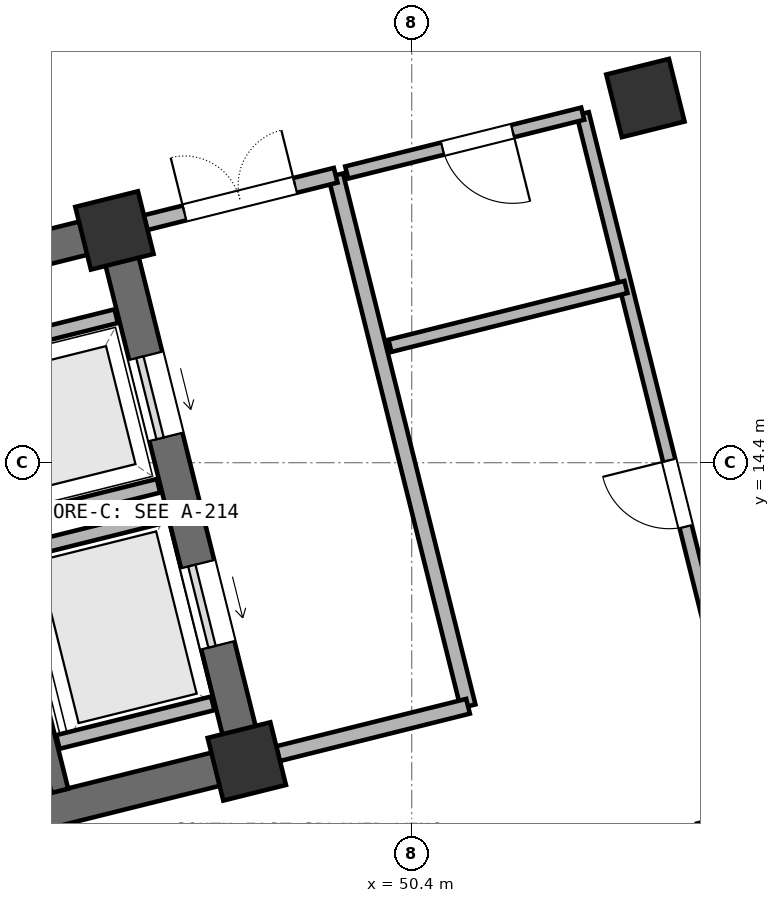
"""IFC4 building model, lengths in metres.
Left out: names, types, materials, properties, quantities, classifications, styles, units other than length and angle.
Written with IfcOpenShell. Run it as: python <this file> out.ifc"""

import sys

from ifc_helpers import new_model, si_unit, direction, frame, frame_2d, origin, origin_2d, place, context, subcontext, project, spatial, rectangle, extrude, element, fill, save


model = new_model("IFC4")
c1 = context("Model", 3, precision=1e-05, world=origin(), true_north=direction((0.0, 1.0)))
c2 = subcontext(c1, "Body", "Model", "MODEL_VIEW")
j1 = project(units=[si_unit("LENGTHUNIT", "METRE"), si_unit("PLANEANGLEUNIT", "RADIAN")], contexts=[c1])
p1 = place(None, origin())
s1 = spatial("IfcSite", under=j1, at=p1, CompositionType="ELEMENT")
p2 = place(p1, origin())
s2 = spatial("IfcBuilding", under=s1, at=p2, CompositionType="ELEMENT")
p3 = place(p2, origin())
s3 = spatial("IfcBuildingStorey", under=s2, at=p3, CompositionType="ELEMENT", Elevation=0.0)
for number, where, z_axis, x_axis in (
    (1, (48.23, 10.47, 0.0), (0.0, 0.0, 1.0), (0.97, 0.242, 0.0)),
    (2, (46.489, 17.456, 0.0), (0.0, 0.0, 1.0), (0.97, 0.242, 0.0)),
    (3, (53.475, 19.198, 0.0), (0.0, 0.0, 1.0), (0.97, 0.242, 0.0)),
):
    element("IfcColumn", number, at=place(p3, frame(where, z_axis=z_axis, x_axis=x_axis)), inside=s3, PredefinedType="COLUMN", context=c2, shape_type="SweptSolid", body=[
        extrude(rectangle(XDim=0.85, YDim=0.85, at=origin_2d()), origin(), (0.0, 0.0, 1.0), 5.4),
    ])
p4 = place(p3, frame((41.584, 8.813, 0.0), z_axis=(0.0, 0.0, 1.0), x_axis=(0.970294759049, 0.241925774902, 0.0)))
e4 = element("IfcWall", 4, at=p4, inside=s3, PredefinedType="SHEAR", context=c2, shape_type="SweptSolid", body=[
    extrude(rectangle(XDim=6.5, YDim=0.45, at=frame_2d((3.25, 0.0))), origin(), (0.0, 0.0, 1.0), 5.4),
])
p5 = place(p3, frame((48.146, 10.809, 0.0), z_axis=(0.0, 0.0, 1.0), x_axis=(-0.241925774902, 0.970294759049, 0.0)))
e5 = element("IfcWall", 5, at=p5, inside=s3, PredefinedType="SHEAR", context=c2, shape_type="SweptSolid", body=[
    extrude(rectangle(XDim=6.5, YDim=0.45, at=frame_2d((3.25, 0.0))), origin(), (0.0, 0.0, 1.0), 5.4),
])
p6 = place(p5, frame((1.225, 0.0, 0.0)))
e6 = element("IfcOpeningElement", 6, at=p6, cuts=e5, PredefinedType="OPENING", context=c2, shape_type="SweptSolid", body=[
    extrude(rectangle(XDim=1.1, YDim=2.2, at=frame_2d((0.55, 1.1))), frame((0.0, 0.235, 0.0), z_axis=(0.0, -1.0, 0.0), x_axis=(1.0, 0.0, 0.0)), (0.0, 0.0, 1.0), 0.47),
])
p7 = place(p5, frame((4.05, 0.0, 0.0)))
e7 = element("IfcOpeningElement", 7, at=p7, cuts=e5, PredefinedType="OPENING", context=c2, shape_type="SweptSolid", body=[
    extrude(rectangle(XDim=1.1, YDim=2.2, at=frame_2d((0.55, 1.1))), frame((0.0, 0.235, 0.0), z_axis=(0.0, -1.0, 0.0), x_axis=(1.0, 0.0, 0.0)), (0.0, 0.0, 1.0), 0.47),
])
p8 = place(p3, frame((46.149, 17.371, 0.0), z_axis=(0.0, 0.0, 1.0), x_axis=(-0.970294759049, -0.241925774902, 0.0)))
e8 = element("IfcWall", 8, at=p8, inside=s3, PredefinedType="SHEAR", context=c2, shape_type="SweptSolid", body=[
    extrude(rectangle(XDim=6.5, YDim=0.45, at=frame_2d((3.25, 0.0))), origin(), (0.0, 0.0, 1.0), 5.4),
])
p9 = place(p8, frame((3.6, 0.0, 0.0)))
e9 = element("IfcOpeningElement", 9, at=p9, cuts=e8, PredefinedType="OPENING", context=c2, shape_type="SweptSolid", body=[
    extrude(rectangle(XDim=1.2, YDim=2.2, at=frame_2d((0.6, 1.1))), frame((0.0, 0.235, 0.0), z_axis=(0.0, -1.0, 0.0), x_axis=(1.0, 0.0, 0.0)), (0.0, 0.0, 1.0), 0.47),
])
p10 = place(p3, frame((45.771, 10.083, 0.0), z_axis=(0.0, 0.0, 1.0), x_axis=(-0.241898249226, 0.970301621673, 0.0)))
e10 = element("IfcWall", 10, at=p10, inside=s3, PredefinedType="SHEAR", context=c2, shape_type="SweptSolid", body=[
    extrude(rectangle(XDim=6.76, YDim=0.225, at=frame_2d((3.38, 0.0))), origin(), (0.0, 0.0, 1.0), 5.4),
])
for number, where, z_axis, x_axis in (
    (11, (45.745, 10.726, 0.0), (0.0, 0.0, 1.0), (0.97, 0.242, 0.0)),
    (12, (45.128, 13.2, 0.0), (0.0, 0.0, 1.0), (0.97, 0.242, 0.0)),
    (13, (45.031, 13.588, 0.0), (0.0, 0.0, 1.0), (0.97, 0.242, 0.0)),
    (14, (44.475, 15.82, 0.0), (0.0, 0.0, 1.0), (0.97, 0.242, 0.0)),
):
    element("IfcWall", number, at=place(p3, frame(where, z_axis=z_axis, x_axis=x_axis)), inside=s3, PredefinedType="PARTITIONING", context=c2, shape_type="SweptSolid", body=[
        extrude(rectangle(XDim=2.1, YDim=0.185, at=frame_2d((1.05, 0.0))), origin(), (0.0, 0.0, 1.0), 5.4),
    ])
p11 = place(p3, frame((51.141, 11.196, 0.0), z_axis=(0.0, 0.0, 1.0), x_axis=(-0.241937193493, 0.970291911955, 0.0)))
e15 = element("IfcWall", 15, at=p11, inside=s3, PredefinedType="PARTITIONING", context=c2, shape_type="SweptSolid", body=[
    extrude(rectangle(XDim=7.2, YDim=0.2, at=frame_2d((3.6, 0.0))), origin(), (0.0, 0.0, 1.0), 4.12),
])
p12 = place(p3, frame((48.638, 10.572, 0.0), z_axis=(0.0, 0.0, 1.0), x_axis=(0.970309259708, 0.2418676095, 0.0)))
e16 = element("IfcWall", 16, at=p12, inside=s3, PredefinedType="PARTITIONING", context=c2, shape_type="SweptSolid", body=[
    extrude(rectangle(XDim=2.58, YDim=0.2, at=frame_2d((1.29, 0.0))), origin(), (0.0, 0.0, 1.0), 4.12),
])
p13 = place(p3, frame((49.399, 18.182, 0.0), z_axis=(0.0, 0.0, 1.0), x_axis=(-0.970309259708, -0.2418676095, 0.0)))
e17 = element("IfcWall", 17, at=p13, inside=s3, PredefinedType="PARTITIONING", context=c2, shape_type="SweptSolid", body=[
    extrude(rectangle(XDim=2.58, YDim=0.2, at=frame_2d((1.29, 0.0))), origin(), (0.0, 0.0, 1.0), 4.12),
])
p14 = place(p13, frame((0.55, 0.0, 0.0)))
e18 = element("IfcOpeningElement", 18, at=p14, cuts=e17, PredefinedType="OPENING", context=c2, shape_type="SweptSolid", body=[
    extrude(rectangle(XDim=1.5, YDim=2.2, at=frame_2d((0.75, 1.1))), frame((0.0, 0.11, 0.0), z_axis=(0.0, -1.0, 0.0), x_axis=(1.0, 0.0, 0.0)), (0.0, 0.0, 1.0), 0.22),
])
p15 = place(p3, frame((54.392, 12.006, 0.0), z_axis=(0.0, 0.0, 1.0), x_axis=(-0.241937193493, 0.970291911955, 0.0)))
e19 = element("IfcWall", 19, at=p15, inside=s3, PredefinedType="PARTITIONING", context=c2, shape_type="SweptSolid", body=[
    extrude(rectangle(XDim=7.2, YDim=0.165, at=frame_2d((3.6, 0.0))), origin(), (0.0, 0.0, 1.0), 4.12),
])
p16 = place(p15, frame((1.6, 0.0, 0.0)))
e20 = element("IfcOpeningElement", 20, at=p16, cuts=e19, PredefinedType="OPENING", context=c2, shape_type="SweptSolid", body=[
    extrude(rectangle(XDim=0.9, YDim=2.15, at=frame_2d((0.45, 1.075))), frame((0.0, 0.093, 0.0), z_axis=(0.0, -1.0, 0.0), x_axis=(1.0, 0.0, 0.0)), (0.0, 0.0, 1.0), 0.185),
])
p17 = place(p3, frame((52.65, 18.992, 0.0), z_axis=(0.0, 0.0, 1.0), x_axis=(-0.970294894235, -0.241925232711, 0.0)))
e21 = element("IfcWall", 21, at=p17, inside=s3, PredefinedType="PARTITIONING", context=c2, shape_type="SweptSolid", body=[
    extrude(rectangle(XDim=3.2, YDim=0.165, at=frame_2d((1.6, 0.0))), origin(), (0.0, 0.0, 1.0), 4.12),
])
p18 = place(p17, frame((0.95, 0.0, 0.0)))
e22 = element("IfcOpeningElement", 22, at=p18, cuts=e21, PredefinedType="OPENING", context=c2, shape_type="SweptSolid", body=[
    extrude(rectangle(XDim=0.95, YDim=2.15, at=frame_2d((0.475, 1.075))), frame((0.0, 0.093, 0.0), z_axis=(0.0, -1.0, 0.0), x_axis=(1.0, 0.0, 0.0)), (0.0, 0.0, 1.0), 0.185),
])
p19 = place(p3, frame((50.114, 15.938, 0.0), z_axis=(0.0, 0.0, 1.0), x_axis=(0.970294894235, 0.241925232711, 0.0)))
e23 = element("IfcWall", 23, at=p19, inside=s3, PredefinedType="PARTITIONING", context=c2, shape_type="SweptSolid", body=[
    extrude(rectangle(XDim=3.2, YDim=0.165, at=frame_2d((1.6, 0.0))), origin(), (0.0, 0.0, 1.0), 4.12),
])
p20 = place(p3, frame((54.172, 9.581, 0.0), z_axis=(0.0, 0.0, 1.0), x_axis=(0.970297344298, 0.241915405976, 0.0)))
e24 = element("IfcWall", 24, at=p20, inside=s3, PredefinedType="PARTITIONING", context=c2, shape_type="SweptSolid", body=[
    extrude(rectangle(XDim=20.1, YDim=0.15, at=frame_2d((10.05, 0.0))), origin(), (0.0, 0.0, 1.0), 4.12),
])
p21 = place(p20, frame((1.65, 0.0, 0.0)))
e25 = element("IfcOpeningElement", 25, at=p21, cuts=e24, PredefinedType="OPENING", context=c2, shape_type="SweptSolid", body=[
    extrude(rectangle(XDim=1.6, YDim=2.2, at=frame_2d((0.8, 1.1))), frame((0.0, 0.085, 0.0), z_axis=(0.0, -1.0, 0.0), x_axis=(1.0, 0.0, 0.0)), (0.0, 0.0, 1.0), 0.17),
])
p22 = place(p6, origin())
e26 = element("IfcDoor", 26, at=p22, inside=s3, OperationType="SLIDING_TO_LEFT", PredefinedType="DOOR", context=c2, shape_type="SweptSolid", body=[
    extrude(rectangle(XDim=1.1, YDim=2.2, at=frame_2d((0.55, 1.1))), frame((0.0, 0.025, 0.0), z_axis=(0.0, -1.0, 0.0), x_axis=(1.0, 0.0, 0.0)), (0.0, 0.0, 1.0), 0.05),
])
fill(e6, e26)
p23 = place(p7, origin())
e27 = element("IfcDoor", 27, at=p23, inside=s3, OperationType="SLIDING_TO_LEFT", PredefinedType="DOOR", context=c2, shape_type="SweptSolid", body=[
    extrude(rectangle(XDim=1.1, YDim=2.2, at=frame_2d((0.55, 1.1))), frame((0.0, 0.025, 0.0), z_axis=(0.0, -1.0, 0.0), x_axis=(1.0, 0.0, 0.0)), (0.0, 0.0, 1.0), 0.05),
])
fill(e7, e27)
p24 = place(p14, frame((1.5, 0.0, 0.0), z_axis=(0.0, 0.0, 1.0), x_axis=(-1.0, 0.0, 0.0)))
e28 = element("IfcDoor", 28, at=p24, inside=s3, OperationType="DOUBLE_DOOR_SINGLE_SWING", PredefinedType="DOOR", context=c2, shape_type="SweptSolid", body=[
    extrude(rectangle(XDim=1.5, YDim=2.2, at=frame_2d((0.75, 1.1))), frame((0.0, 0.025, 0.0), z_axis=(0.0, -1.0, 0.0), x_axis=(1.0, 0.0, 0.0)), (0.0, 0.0, 1.0), 0.05),
])
fill(e18, e28)
p25 = place(p16, origin())
e29 = element("IfcDoor", 29, at=p25, inside=s3, OperationType="SINGLE_SWING_RIGHT", PredefinedType="DOOR", context=c2, shape_type="SweptSolid", body=[
    extrude(rectangle(XDim=0.9, YDim=2.15, at=frame_2d((0.45, 1.075))), frame((0.0, 0.025, 0.0), z_axis=(0.0, -1.0, 0.0), x_axis=(1.0, 0.0, 0.0)), (0.0, 0.0, 1.0), 0.05),
])
fill(e20, e29)
p26 = place(p18, origin())
e30 = element("IfcDoor", 30, at=p26, inside=s3, OperationType="SINGLE_SWING_LEFT", PredefinedType="DOOR", context=c2, shape_type="SweptSolid", body=[
    extrude(rectangle(XDim=0.95, YDim=2.15, at=frame_2d((0.475, 1.075))), frame((0.0, 0.025, 0.0), z_axis=(0.0, -1.0, 0.0), x_axis=(1.0, 0.0, 0.0)), (0.0, 0.0, 1.0), 0.05),
])
fill(e22, e30)
save(model, sys.argv[1])
